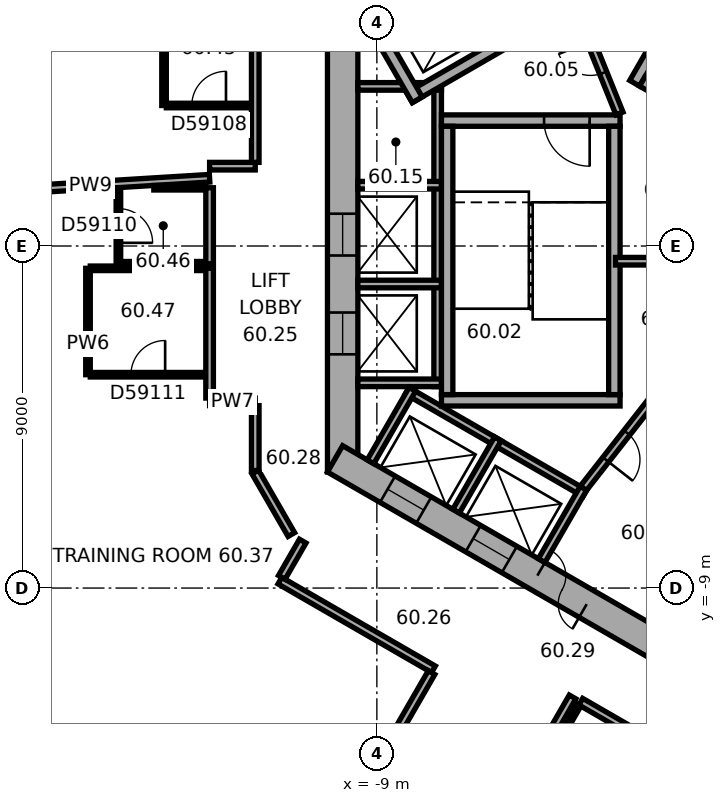
"""IFC4 building model, lengths in metres.
Left out: names, types, materials, properties, quantities, classifications, styles, units other than length and angle.
Written with IfcOpenShell. Run it as: python <this file> out.ifc"""

import sys

from ifc_helpers import new_model, si_unit, direction, frame, frame_2d, origin, place, context, subcontext, project, spatial, rectangle, extrude, element, fill, save


model = new_model("IFC4")
c1 = context("Model", 3, precision=1e-05, world=origin(), true_north=direction((0.0, 1.0)))
c2 = subcontext(c1, "Body", "Model", "MODEL_VIEW")
j1 = project(units=[si_unit("LENGTHUNIT", "METRE"), si_unit("PLANEANGLEUNIT", "RADIAN")], contexts=[c1])
p1 = place(None, origin())
s1 = spatial("IfcSite", under=j1, at=p1, CompositionType="ELEMENT")
p2 = place(p1, origin())
s2 = spatial("IfcBuilding", under=s1, at=p2, CompositionType="ELEMENT")
p3 = place(p2, frame((0.0, 0.0, 243.9)))
s3 = spatial("IfcBuildingStorey", under=s2, at=p3, CompositionType="ELEMENT", Elevation=243.9)
p4 = place(p3, frame((-9.9, 5.947, 0.0), z_axis=(0.0, 0.0, 1.0), x_axis=(0.0, -1.0, 0.0)))
e1 = element("IfcWall", 1, at=p4, inside=s3, PredefinedType="SHEAR", context=c2, shape_type="SweptSolid", body=[
    extrude(rectangle(XDim=11.894, YDim=0.8, at=frame_2d((5.947, 0.0))), origin(), (0.0, 0.0, 1.0), 3.7),
])
p5 = place(p4, frame((5.097, 0.0, 0.0)))
e2 = element("IfcOpeningElement", 2, at=p5, cuts=e1, PredefinedType="OPENING", context=c2, shape_type="SweptSolid", body=[
    extrude(rectangle(XDim=1.1, YDim=2.1, at=frame_2d((0.55, 1.05))), frame((0.0, 0.41, 0.0), z_axis=(0.0, -1.0, 0.0), x_axis=(1.0, 0.0, 0.0)), (0.0, 0.0, 1.0), 0.82),
])
p6 = place(p4, frame((7.697, 0.0, 0.0)))
e3 = element("IfcOpeningElement", 3, at=p6, cuts=e1, PredefinedType="OPENING", context=c2, shape_type="SweptSolid", body=[
    extrude(rectangle(XDim=1.1, YDim=2.1, at=frame_2d((0.55, 1.05))), frame((0.0, 0.41, 0.0), z_axis=(0.0, -1.0, 0.0), x_axis=(1.0, 0.0, 0.0)), (0.0, 0.0, 1.0), 0.82),
])
p7 = place(p3, frame((-10.1, -5.6, 0.0), z_axis=(0.0, 0.0, 1.0), x_axis=(0.866023897231, -0.500002609418, 0.0)))
e4 = element("IfcWall", 4, at=p7, inside=s3, PredefinedType="SHEAR", context=c2, shape_type="SweptSolid", body=[
    extrude(rectangle(XDim=11.894, YDim=0.8, at=frame_2d((5.947, 0.0))), origin(), (0.0, 0.0, 1.0), 3.7),
])
p8 = place(p7, frame((6.147, 0.0, 0.0)))
e5 = element("IfcOpeningElement", 5, at=p8, cuts=e4, PredefinedType="OPENING", context=c2, shape_type="SweptSolid", body=[
    extrude(rectangle(XDim=1.5, YDim=2.1, at=frame_2d((0.75, 1.05))), frame((0.0, 0.41, 0.0), z_axis=(0.0, -1.0, 0.0), x_axis=(1.0, 0.0, 0.0)), (0.0, 0.0, 1.0), 0.82),
])
p9 = place(p7, frame((1.597, 0.0, 0.0)))
e6 = element("IfcOpeningElement", 6, at=p9, cuts=e4, PredefinedType="OPENING", context=c2, shape_type="SweptSolid", body=[
    extrude(rectangle(XDim=1.1, YDim=2.1, at=frame_2d((0.55, 1.05))), frame((0.0, 0.41, 0.0), z_axis=(0.0, -1.0, 0.0), x_axis=(1.0, 0.0, 0.0)), (0.0, 0.0, 1.0), 0.82),
])
p10 = place(p7, frame((4.197, 0.0, 0.0)))
e7 = element("IfcOpeningElement", 7, at=p10, cuts=e4, PredefinedType="OPENING", context=c2, shape_type="SweptSolid", body=[
    extrude(rectangle(XDim=1.1, YDim=2.1, at=frame_2d((0.55, 1.05))), frame((0.0, 0.41, 0.0), z_axis=(0.0, -1.0, 0.0), x_axis=(1.0, 0.0, 0.0)), (0.0, 0.0, 1.0), 0.82),
])
p11 = place(p3, frame((-7.4, 4.3, 0.0), z_axis=(0.0, 0.0, 1.0), x_axis=(0.0, -1.0, 0.0)))
e8 = element("IfcWall", 8, at=p11, inside=s3, PredefinedType="PARTITIONING", context=c2, shape_type="SweptSolid", body=[
    extrude(rectangle(XDim=8.0, YDim=0.2, at=frame_2d((4.0, 0.0))), origin(), (0.0, 0.0, 1.0), 3.42),
])
for number, where, z_axis, x_axis in (
    (9, (-7.3, 4.2, 0.0), (0.0, 0.0, 1.0), (-1.0, 0.0, 0.0)),
    (10, (-7.3, 1.6, 0.0), (0.0, 0.0, 1.0), (-1.0, 0.0, 0.0)),
    (11, (-7.3, -1.0, 0.0), (0.0, 0.0, 1.0), (-1.0, 0.0, 0.0)),
    (12, (-7.3, -3.6, 0.0), (0.0, 0.0, 1.0), (-1.0, 0.0, 0.0)),
):
    element("IfcWall", number, at=place(p3, frame(where, z_axis=z_axis, x_axis=x_axis)), inside=s3, PredefinedType="PARTITIONING", context=c2, shape_type="SweptSolid", body=[
        extrude(rectangle(XDim=2.2, YDim=0.2, at=frame_2d((1.1, 0.0))), origin(), (0.0, 0.0, 1.0), 3.42),
    ])
p12 = place(p3, frame((-8.203, -3.809, 0.0), z_axis=(0.0, 0.0, 1.0), x_axis=(0.866028230842, -0.499995103361, 0.0)))
e13 = element("IfcWall", 13, at=p12, inside=s3, PredefinedType="PARTITIONING", context=c2, shape_type="SweptSolid", body=[
    extrude(rectangle(XDim=5.4, YDim=0.2, at=frame_2d((2.7, 0.0))), origin(), (0.0, 0.0, 1.0), 3.42),
])
for number, where, z_axis, x_axis in (
    (14, (-8.067, -3.772, 0.0), (0.0, 0.0, 1.0), (-0.5, -0.866, 0.0)),
    (15, (-5.815, -5.072, 0.0), (0.0, 0.0, 1.0), (-0.5, -0.866, 0.0)),
):
    element("IfcWall", number, at=place(p3, frame(where, z_axis=z_axis, x_axis=x_axis)), inside=s3, PredefinedType="PARTITIONING", context=c2, shape_type="SweptSolid", body=[
        extrude(rectangle(XDim=2.2, YDim=0.2, at=frame_2d((1.1, 0.0))), origin(), (0.0, 0.0, 1.0), 3.42),
    ])
p13 = place(p3, frame((-3.563, -6.372, 0.0), z_axis=(0.0, 0.0, 1.0), x_axis=(-0.499994660107, -0.866028486751, 0.0)))
e16 = element("IfcWall", 16, at=p13, inside=s3, PredefinedType="PARTITIONING", context=c2, shape_type="SweptSolid", body=[
    extrude(rectangle(XDim=2.2, YDim=0.2, at=frame_2d((1.1, 0.0))), origin(), (0.0, 0.0, 1.0), 3.42),
])
p14 = place(p3, frame((-2.216, 4.282, 0.0), z_axis=(0.0, 0.0, 1.0), x_axis=(0.499977259774, 0.866038532462, 0.0)))
e17 = element("IfcWall", 17, at=p14, inside=s3, PredefinedType="SHEAR", context=c2, shape_type="SweptSolid", body=[
    extrude(rectangle(XDim=4.7, YDim=0.3, at=frame_2d((2.35, 0.0))), origin(), (0.0, 0.0, 1.0), 3.42),
])
p15 = place(p3, frame((4.103, 0.807, 0.0), z_axis=(0.0, 0.0, 1.0), x_axis=(-0.866027801685, 0.499995846692, 0.0)))
e18 = element("IfcWall", 18, at=p15, inside=s3, PredefinedType="SHEAR", context=c2, shape_type="SweptSolid", body=[
    extrude(rectangle(XDim=7.06, YDim=0.3, at=frame_2d((3.53, 0.0))), origin(), (0.0, 0.0, 1.0), 3.42),
])
p16 = place(p3, frame((-2.6, 3.3, 0.0), z_axis=(0.0, 0.0, 1.0), x_axis=(-1.0, 0.0, 0.0)))
e19 = element("IfcWall", 19, at=p16, inside=s3, PredefinedType="SHEAR", context=c2, shape_type="SweptSolid", body=[
    extrude(rectangle(XDim=4.7, YDim=0.3, at=frame_2d((2.35, 0.0))), origin(), (0.0, 0.0, 1.0), 3.42),
])
p17 = place(p16, frame((0.8, 0.0, 0.0)))
e20 = element("IfcOpeningElement", 20, at=p17, cuts=e19, PredefinedType="OPENING", context=c2, shape_type="SweptSolid", body=[
    extrude(rectangle(XDim=1.2, YDim=2.1, at=frame_2d((0.6, 1.05))), frame((0.0, 0.16, 0.0), z_axis=(0.0, -1.0, 0.0), x_axis=(1.0, 0.0, 0.0)), (0.0, 0.0, 1.0), 0.32),
])
p18 = place(p3, frame((-2.6, -4.06, 0.0), z_axis=(0.0, 0.0, 1.0), x_axis=(-1.0, 0.0, 0.0)))
e21 = element("IfcWall", 21, at=p18, inside=s3, PredefinedType="SHEAR", context=c2, shape_type="SweptSolid", body=[
    extrude(rectangle(XDim=4.7, YDim=0.3, at=frame_2d((2.35, 0.0))), origin(), (0.0, 0.0, 1.0), 3.42),
])
for number, where, z_axis, x_axis in (
    (22, (-2.75, 3.15, 0.0), (0.0, 0.0, 1.0), (0.0, -1.0, 0.0)),
    (23, (-7.15, 3.15, 0.0), (0.0, 0.0, 1.0), (0.0, -1.0, 0.0)),
):
    element("IfcWall", number, at=place(p3, frame(where, z_axis=z_axis, x_axis=x_axis)), inside=s3, PredefinedType="SHEAR", context=c2, shape_type="SweptSolid", body=[
        extrude(rectangle(XDim=7.06, YDim=0.3, at=frame_2d((3.53, 0.0))), origin(), (0.0, 0.0, 1.0), 3.42),
    ])
p19 = place(p3, frame((-5.24, 5.577, 0.0), z_axis=(0.0, 0.0, 1.0), x_axis=(-0.866014461049, -0.500018952895, 0.0)))
e24 = element("IfcWall", 24, at=p19, inside=s3, PredefinedType="SHEAR", context=c2, shape_type="SweptSolid", body=[
    extrude(rectangle(XDim=3.35, YDim=0.3, at=frame_2d((1.675, 0.0))), origin(), (0.0, 0.0, 1.0), 3.42),
])
p20 = place(p3, frame((-7.937, 3.847, 0.0), z_axis=(0.0, 0.0, 1.0), x_axis=(-0.50002983664, 0.866008176907, 0.0)))
e25 = element("IfcWall", 25, at=p20, inside=s3, PredefinedType="SHEAR", context=c2, shape_type="SweptSolid", body=[
    extrude(rectangle(XDim=2.2, YDim=0.3, at=frame_2d((1.1, 0.0))), origin(), (0.0, 0.0, 1.0), 3.42),
])
p21 = place(p3, frame((-2.615, 3.487, 0.0), z_axis=(0.0, 0.0, 1.0), x_axis=(-0.373576831041, 0.92759924068, 0.0)))
e26 = element("IfcWall", 26, at=p21, inside=s3, PredefinedType="PARTITIONING", context=c2, shape_type="SweptSolid", body=[
    extrude(rectangle(XDim=3.002, YDim=0.2, at=frame_2d((1.501, 0.0))), origin(), (0.0, 0.0, 1.0), 3.42),
])
p22 = place(p21, frame((1.15, 0.0, 0.0)))
e27 = element("IfcOpeningElement", 27, at=p22, cuts=e26, PredefinedType="OPENING", context=c2, shape_type="SweptSolid", body=[
    extrude(rectangle(XDim=0.9, YDim=2.1, at=frame_2d((0.45, 1.05))), frame((0.0, 0.11, 0.0), z_axis=(0.0, -1.0, 0.0), x_axis=(1.0, 0.0, 0.0)), (0.0, 0.0, 1.0), 0.22),
])
p23 = place(p3, frame((-1.712, -4.008, 0.0), z_axis=(0.0, 0.0, 1.0), x_axis=(-0.616549420702, -0.787316208287, 0.0)))
e28 = element("IfcWall", 28, at=p23, inside=s3, PredefinedType="PARTITIONING", context=c2, shape_type="SweptSolid", body=[
    extrude(rectangle(XDim=3.002, YDim=0.2, at=frame_2d((1.501, 0.0))), origin(), (0.0, 0.0, 1.0), 3.42),
])
p24 = place(p23, frame((1.15, 0.0, 0.0)))
e29 = element("IfcOpeningElement", 29, at=p24, cuts=e28, PredefinedType="OPENING", context=c2, shape_type="SweptSolid", body=[
    extrude(rectangle(XDim=0.9, YDim=2.1, at=frame_2d((0.45, 1.05))), frame((0.0, 0.11, 0.0), z_axis=(0.0, -1.0, 0.0), x_axis=(1.0, 0.0, 0.0)), (0.0, 0.0, 1.0), 0.22),
])
p25 = place(p3, frame((-2.72, -0.4, 0.0), z_axis=(0.0, 0.0, 1.0), x_axis=(1.0, 0.0, 0.0)))
e30 = element("IfcWall", 30, at=p25, inside=s3, PredefinedType="PARTITIONING", context=c2, shape_type="SweptSolid", body=[
    extrude(rectangle(XDim=7.347, YDim=0.2, at=frame_2d((3.674, 0.0))), origin(), (0.0, 0.0, 1.0), 3.42),
])
p26 = place(p3, frame((-19.672, 1.4, 0.0), z_axis=(0.0, 0.0, 1.0), x_axis=(0.99813499784, 0.061045278997, 0.0)))
e31 = element("IfcWall", 31, at=p26, inside=s3, PredefinedType="PARTITIONING", context=c2, shape_type="SweptSolid", body=[
    extrude(rectangle(XDim=6.283, YDim=0.2, at=frame_2d((3.142, 0.0))), origin(), (0.0, 0.0, 1.0), 2.87),
])
p27 = place(p3, frame((-16.601, -3.387, 0.0), z_axis=(0.0, 0.0, 1.0), x_axis=(0.0, 1.0, 0.0)))
e32 = element("IfcWall", 32, at=p27, inside=s3, PredefinedType="PARTITIONING", context=c2, shape_type="SweptSolid", body=[
    extrude(rectangle(XDim=2.8, YDim=0.12, at=frame_2d((1.4, 0.0))), origin(), (0.0, 0.0, 1.0), 3.42),
])
p28 = place(p3, frame((-16.541, -0.587, 0.0), z_axis=(0.0, 0.0, 1.0), x_axis=(1.0, 0.0, 0.0)))
e33 = element("IfcWall", 33, at=p28, inside=s3, PredefinedType="PARTITIONING", context=c2, shape_type="SweptSolid", body=[
    extrude(rectangle(XDim=3.04, YDim=0.12, at=frame_2d((1.52, 0.0))), origin(), (0.0, 0.0, 1.0), 3.42),
])
p29 = place(p3, frame((-15.801, -0.467, 0.0), z_axis=(0.0, 0.0, 1.0), x_axis=(0.0, 1.0, 0.0)))
e34 = element("IfcWall", 34, at=p29, inside=s3, PredefinedType="PARTITIONING", context=c2, shape_type="SweptSolid", body=[
    extrude(rectangle(XDim=2.0, YDim=0.12, at=frame_2d((1.0, 0.0))), origin(), (0.0, 0.0, 1.0), 3.42),
])
p30 = place(p29, frame((0.55, 0.0, 0.0)))
e35 = element("IfcOpeningElement", 35, at=p30, cuts=e34, PredefinedType="OPENING", context=c2, shape_type="SweptSolid", body=[
    extrude(rectangle(XDim=0.9, YDim=2.1, at=frame_2d((0.45, 1.05))), frame((0.0, 0.07, 0.0), z_axis=(0.0, -1.0, 0.0), x_axis=(1.0, 0.0, 0.0)), (0.0, 0.0, 1.0), 0.14),
])
p31 = place(p3, frame((-14.869, 1.533, 0.0), z_axis=(0.0, 0.0, 1.0), x_axis=(1.0, 0.0, 0.0)))
e36 = element("IfcWall", 36, at=p31, inside=s3, PredefinedType="PARTITIONING", context=c2, shape_type="SweptSolid", body=[
    extrude(rectangle(XDim=1.368, YDim=0.12, at=frame_2d((0.684, 0.0))), origin(), (0.0, 0.0, 1.0), 3.42),
])
p32 = place(p3, frame((-14.6, 3.697, 0.0), z_axis=(0.0, 0.0, 1.0), x_axis=(0.0, 1.0, 0.0)))
e37 = element("IfcWall", 37, at=p32, inside=s3, PredefinedType="PARTITIONING", context=c2, shape_type="SweptSolid", body=[
    extrude(rectangle(XDim=2.0, YDim=0.12, at=frame_2d((1.0, 0.0))), origin(), (0.0, 0.0, 1.0), 3.42),
])
p33 = place(p3, frame((-13.501, -3.387, 0.0), z_axis=(0.0, 0.0, 1.0), x_axis=(-1.0, 0.0, 0.0)))
e38 = element("IfcWall", 38, at=p33, inside=s3, PredefinedType="PARTITIONING", context=c2, shape_type="SweptSolid", body=[
    extrude(rectangle(XDim=3.04, YDim=0.12, at=frame_2d((1.52, 0.0))), origin(), (0.0, 0.0, 1.0), 3.42),
])
p34 = place(p33, frame((1.07, 0.0, 0.0)))
e39 = element("IfcOpeningElement", 39, at=p34, cuts=e38, PredefinedType="OPENING", context=c2, shape_type="SweptSolid", body=[
    extrude(rectangle(XDim=0.9, YDim=2.1, at=frame_2d((0.45, 1.05))), frame((0.0, 0.07, 0.0), z_axis=(0.0, -1.0, 0.0), x_axis=(1.0, 0.0, 0.0)), (0.0, 0.0, 1.0), 0.14),
])
p35 = place(p3, frame((-13.501, -0.467, 0.0), z_axis=(0.0, 0.0, 1.0), x_axis=(-1.0, 0.0, 0.0)))
e40 = element("IfcWall", 40, at=p35, inside=s3, PredefinedType="PARTITIONING", context=c2, shape_type="SweptSolid", body=[
    extrude(rectangle(XDim=2.24, YDim=0.12, at=frame_2d((1.12, 0.0))), origin(), (0.0, 0.0, 1.0), 3.42),
])
p36 = place(p3, frame((-13.401, -4.101, 0.0), z_axis=(0.0, 0.0, 1.0), x_axis=(1.0, 0.0, 0.0)))
e41 = element("IfcWall", 41, at=p36, inside=s3, PredefinedType="PARTITIONING", context=c2, shape_type="SweptSolid", body=[
    extrude(rectangle(XDim=1.201, YDim=0.2, at=frame_2d((0.601, 0.0))), origin(), (0.0, 0.0, 1.0), 3.42),
])
p37 = place(p3, frame((-13.401, -0.587, 0.0), z_axis=(0.0, 0.0, 1.0), x_axis=(0.0, -1.0, 0.0)))
e42 = element("IfcWall", 42, at=p37, inside=s3, PredefinedType="PARTITIONING", context=c2, shape_type="SweptSolid", body=[
    extrude(rectangle(XDim=3.414, YDim=0.2, at=frame_2d((1.707, 0.0))), origin(), (0.0, 0.0, 1.0), 3.42),
])
p38 = place(p3, frame((-13.401, 1.533, 0.0), z_axis=(0.0, 0.0, 1.0), x_axis=(0.0, -1.0, 0.0)))
e43 = element("IfcWall", 43, at=p38, inside=s3, PredefinedType="PARTITIONING", context=c2, shape_type="SweptSolid", body=[
    extrude(rectangle(XDim=2.0, YDim=0.2, at=frame_2d((1.0, 0.0))), origin(), (0.0, 0.0, 1.0), 3.42),
])
p39 = place(p3, frame((-12.3, 3.697, 0.0), z_axis=(0.0, 0.0, 1.0), x_axis=(-1.0, 0.0, 0.0)))
e44 = element("IfcWall", 44, at=p39, inside=s3, PredefinedType="PARTITIONING", context=c2, shape_type="SweptSolid", body=[
    extrude(rectangle(XDim=2.24, YDim=0.12, at=frame_2d((1.12, 0.0))), origin(), (0.0, 0.0, 1.0), 3.42),
])
p40 = place(p39, frame((0.67, 0.0, 0.0)))
e45 = element("IfcOpeningElement", 45, at=p40, cuts=e44, PredefinedType="OPENING", context=c2, shape_type="SweptSolid", body=[
    extrude(rectangle(XDim=0.9, YDim=2.1, at=frame_2d((0.45, 1.05))), frame((0.0, 0.07, 0.0), z_axis=(0.0, -1.0, 0.0), x_axis=(1.0, 0.0, 0.0)), (0.0, 0.0, 1.0), 0.14),
])
p41 = place(p3, frame((-12.2, -5.947, 0.0), z_axis=(0.0, 0.0, 1.0), x_axis=(0.500022797313, -0.86601224135, 0.0)))
e46 = element("IfcWall", 46, at=p41, inside=s3, PredefinedType="PARTITIONING", context=c2, shape_type="SweptSolid", body=[
    extrude(rectangle(XDim=1.9, YDim=0.2, at=frame_2d((0.95, 0.0))), origin(), (0.0, 0.0, 1.0), 3.42),
])
p42 = place(p3, frame((-12.2, -4.201, 0.0), z_axis=(0.0, 0.0, 1.0), x_axis=(0.0, -1.0, 0.0)))
e47 = element("IfcWall", 47, at=p42, inside=s3, PredefinedType="PARTITIONING", context=c2, shape_type="SweptSolid", body=[
    extrude(rectangle(XDim=1.706, YDim=0.2, at=frame_2d((0.853, 0.0))), origin(), (0.0, 0.0, 1.0), 3.42),
])
p43 = place(p3, frame((-12.2, 2.101, 0.0), z_axis=(0.0, 0.0, 1.0), x_axis=(-1.0, 0.0, 0.0)))
e48 = element("IfcWall", 48, at=p43, inside=s3, PredefinedType="PARTITIONING", context=c2, shape_type="SweptSolid", body=[
    extrude(rectangle(XDim=1.201, YDim=0.2, at=frame_2d((0.601, 0.0))), origin(), (0.0, 0.0, 1.0), 3.42),
])
p44 = place(p3, frame((-12.2, 5.697, 0.0), z_axis=(0.0, 0.0, 1.0), x_axis=(0.0, -1.0, 0.0)))
e49 = element("IfcWall", 49, at=p44, inside=s3, PredefinedType="PARTITIONING", context=c2, shape_type="SweptSolid", body=[
    extrude(rectangle(XDim=3.496, YDim=0.2, at=frame_2d((1.748, 0.0))), origin(), (0.0, 0.0, 1.0), 3.42),
])
p45 = place(p3, frame((-11.551, -8.805, 0.0), z_axis=(0.0, 0.0, 1.0), x_axis=(0.866038310922, -0.499977643516, 0.0)))
e50 = element("IfcWall", 50, at=p45, inside=s3, PredefinedType="PARTITIONING", context=c2, shape_type="SweptSolid", body=[
    extrude(rectangle(XDim=4.665, YDim=0.2, at=frame_2d((2.333, 0.0))), origin(), (0.0, 0.0, 1.0), 3.42),
])
p46 = place(p3, frame((-10.951, -7.765, 0.0), z_axis=(0.0, 0.0, 1.0), x_axis=(-0.499978356969, -0.866037899034, 0.0)))
e51 = element("IfcWall", 51, at=p46, inside=s3, PredefinedType="PARTITIONING", context=c2, shape_type="SweptSolid", body=[
    extrude(rectangle(XDim=1.101, YDim=0.2, at=frame_2d((0.551, 0.0))), origin(), (0.0, 0.0, 1.0), 3.42),
])
p47 = place(p3, frame((-10.585, -16.463, 0.0), z_axis=(0.0, 0.0, 1.0), x_axis=(0.499993802756, 0.866028981735, 0.0)))
e52 = element("IfcWall", 52, at=p47, inside=s3, PredefinedType="PARTITIONING", context=c2, shape_type="SweptSolid", body=[
    extrude(rectangle(XDim=6.049, YDim=0.2, at=frame_2d((3.024, 0.0))), origin(), (0.0, 0.0, 1.0), 2.87),
])
p48 = place(p47, frame((2.524, 0.0, 0.0)))
e53 = element("IfcOpeningElement", 53, at=p48, cuts=e52, PredefinedType="OPENING", context=c2, shape_type="SweptSolid", body=[
    extrude(rectangle(XDim=1.0, YDim=2.1, at=frame_2d((0.5, 1.05))), frame((0.0, 0.11, 0.0), z_axis=(0.0, -1.0, 0.0), x_axis=(1.0, 0.0, 0.0)), (0.0, 0.0, 1.0), 0.22),
])
p49 = place(p3, frame((-7.525, -18.23, 0.0), z_axis=(0.0, 0.0, 1.0), x_axis=(0.499983153418, 0.866035129944, 0.0)))
e54 = element("IfcWall", 54, at=p49, inside=s3, PredefinedType="PARTITIONING", context=c2, shape_type="SweptSolid", body=[
    extrude(rectangle(XDim=7.35, YDim=0.2, at=frame_2d((3.675, 0.0))), origin(), (0.0, 0.0, 1.0), 3.42),
])
p50 = place(p49, frame((3.175, 0.0, 0.0)))
e55 = element("IfcOpeningElement", 55, at=p50, cuts=e54, PredefinedType="OPENING", context=c2, shape_type="SweptSolid", body=[
    extrude(rectangle(XDim=1.0, YDim=2.1, at=frame_2d((0.5, 1.05))), frame((0.0, 0.11, 0.0), z_axis=(0.0, -1.0, 0.0), x_axis=(1.0, 0.0, 0.0)), (0.0, 0.0, 1.0), 0.22),
])
p51 = place(p3, frame((-4.934, -14.241, 0.0), z_axis=(0.0, 0.0, 1.0), x_axis=(0.500004234368, 0.866022959057, 0.0)))
e56 = element("IfcWall", 56, at=p51, inside=s3, PredefinedType="PARTITIONING", context=c2, shape_type="SweptSolid", body=[
    extrude(rectangle(XDim=2.5, YDim=0.12, at=frame_2d((1.25, 0.0))), origin(), (0.0, 0.0, 1.0), 3.42),
])
p52 = place(p3, frame((-3.634, -11.99, 0.0), z_axis=(0.0, 0.0, 1.0), x_axis=(0.866033392248, -0.499986163319, 0.0)))
e57 = element("IfcWall", 57, at=p52, inside=s3, PredefinedType="PARTITIONING", context=c2, shape_type="SweptSolid", body=[
    extrude(rectangle(XDim=3.099, YDim=0.2, at=frame_2d((1.549, 0.0))), origin(), (0.0, 0.0, 1.0), 3.42),
])
p53 = place(p8, origin())
e58 = element("IfcDoor", 58, at=p53, inside=s3, OperationType="DOUBLE_DOOR_SINGLE_SWING", PredefinedType="DOOR", context=c2, shape_type="SweptSolid", body=[
    extrude(rectangle(XDim=1.5, YDim=2.1, at=frame_2d((0.75, 1.05))), frame((0.0, 0.025, 0.0), z_axis=(0.0, -1.0, 0.0), x_axis=(1.0, 0.0, 0.0)), (0.0, 0.0, 1.0), 0.05),
])
fill(e5, e58)
p54 = place(p17, origin())
e59 = element("IfcDoor", 59, at=p54, inside=s3, OperationType="SINGLE_SWING_RIGHT", PredefinedType="DOOR", context=c2, shape_type="SweptSolid", body=[
    extrude(rectangle(XDim=1.2, YDim=2.1, at=frame_2d((0.6, 1.05))), frame((0.0, 0.025, 0.0), z_axis=(0.0, -1.0, 0.0), x_axis=(1.0, 0.0, 0.0)), (0.0, 0.0, 1.0), 0.05),
])
fill(e20, e59)
p55 = place(p22, origin())
e60 = element("IfcDoor", 60, at=p55, inside=s3, OperationType="SINGLE_SWING_LEFT", PredefinedType="DOOR", context=c2, shape_type="SweptSolid", body=[
    extrude(rectangle(XDim=0.9, YDim=2.1, at=frame_2d((0.45, 1.05))), frame((0.0, 0.025, 0.0), z_axis=(0.0, -1.0, 0.0), x_axis=(1.0, 0.0, 0.0)), (0.0, 0.0, 1.0), 0.05),
])
fill(e27, e60)
p56 = place(p24, origin())
e61 = element("IfcDoor", 61, at=p56, inside=s3, OperationType="SINGLE_SWING_LEFT", PredefinedType="DOOR", context=c2, shape_type="SweptSolid", body=[
    extrude(rectangle(XDim=0.9, YDim=2.1, at=frame_2d((0.45, 1.05))), frame((0.0, 0.025, 0.0), z_axis=(0.0, -1.0, 0.0), x_axis=(1.0, 0.0, 0.0)), (0.0, 0.0, 1.0), 0.05),
])
fill(e29, e61)
p57 = place(p5, origin())
e62 = element("IfcDoor", 62, at=p57, inside=s3, OperationType="DOUBLE_DOOR_SLIDING", PredefinedType="DOOR", context=c2, shape_type="SweptSolid", body=[
    extrude(rectangle(XDim=1.1, YDim=2.1, at=frame_2d((0.55, 1.05))), frame((0.0, 0.025, 0.0), z_axis=(0.0, -1.0, 0.0), x_axis=(1.0, 0.0, 0.0)), (0.0, 0.0, 1.0), 0.05),
])
fill(e2, e62)
p58 = place(p6, origin())
e63 = element("IfcDoor", 63, at=p58, inside=s3, OperationType="DOUBLE_DOOR_SLIDING", PredefinedType="DOOR", context=c2, shape_type="SweptSolid", body=[
    extrude(rectangle(XDim=1.1, YDim=2.1, at=frame_2d((0.55, 1.05))), frame((0.0, 0.025, 0.0), z_axis=(0.0, -1.0, 0.0), x_axis=(1.0, 0.0, 0.0)), (0.0, 0.0, 1.0), 0.05),
])
fill(e3, e63)
p59 = place(p9, origin())
e64 = element("IfcDoor", 64, at=p59, inside=s3, OperationType="DOUBLE_DOOR_SLIDING", PredefinedType="DOOR", context=c2, shape_type="SweptSolid", body=[
    extrude(rectangle(XDim=1.1, YDim=2.1, at=frame_2d((0.55, 1.05))), frame((0.0, 0.025, 0.0), z_axis=(0.0, -1.0, 0.0), x_axis=(1.0, 0.0, 0.0)), (0.0, 0.0, 1.0), 0.05),
])
fill(e6, e64)
p60 = place(p10, origin())
e65 = element("IfcDoor", 65, at=p60, inside=s3, OperationType="DOUBLE_DOOR_SLIDING", PredefinedType="DOOR", context=c2, shape_type="SweptSolid", body=[
    extrude(rectangle(XDim=1.1, YDim=2.1, at=frame_2d((0.55, 1.05))), frame((0.0, 0.025, 0.0), z_axis=(0.0, -1.0, 0.0), x_axis=(1.0, 0.0, 0.0)), (0.0, 0.0, 1.0), 0.05),
])
fill(e7, e65)
p61 = place(p40, origin())
e66 = element("IfcDoor", 66, at=p61, inside=s3, OperationType="SINGLE_SWING_LEFT", PredefinedType="DOOR", context=c2, shape_type="SweptSolid", body=[
    extrude(rectangle(XDim=0.9, YDim=2.1, at=frame_2d((0.45, 1.05))), frame((0.0, 0.025, 0.0), z_axis=(0.0, -1.0, 0.0), x_axis=(1.0, 0.0, 0.0)), (0.0, 0.0, 1.0), 0.05),
])
fill(e45, e66)
p62 = place(p30, origin())
e67 = element("IfcDoor", 67, at=p62, inside=s3, OperationType="SINGLE_SWING_LEFT", PredefinedType="DOOR", context=c2, shape_type="SweptSolid", body=[
    extrude(rectangle(XDim=0.9, YDim=2.1, at=frame_2d((0.45, 1.05))), frame((0.0, 0.025, 0.0), z_axis=(0.0, -1.0, 0.0), x_axis=(1.0, 0.0, 0.0)), (0.0, 0.0, 1.0), 0.05),
])
fill(e35, e67)
p63 = place(p34, origin())
e68 = element("IfcDoor", 68, at=p63, inside=s3, OperationType="SINGLE_SWING_LEFT", PredefinedType="DOOR", context=c2, shape_type="SweptSolid", body=[
    extrude(rectangle(XDim=0.9, YDim=2.1, at=frame_2d((0.45, 1.05))), frame((0.0, 0.025, 0.0), z_axis=(0.0, -1.0, 0.0), x_axis=(1.0, 0.0, 0.0)), (0.0, 0.0, 1.0), 0.05),
])
fill(e39, e68)
save(model, sys.argv[1])
